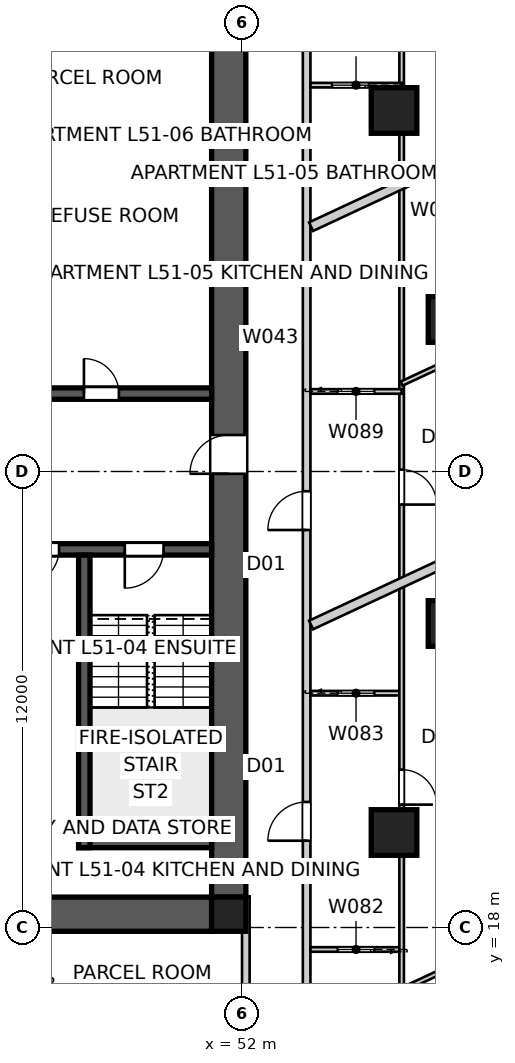
"""IFC4 building model, lengths in metres.
Left out: names, types, materials, properties, quantities, classifications, styles, units other than length and angle.
Written with IfcOpenShell. Run it as: python <this file> out.ifc"""

import sys

from ifc_helpers import new_model, si_unit, direction, frame, frame_2d, origin, origin_2d, place, context, subcontext, project, spatial, polyline, rectangle, outline, extrude, element, fill, save


model = new_model("IFC4")
c1 = context("Model", 3, precision=1e-05, world=origin(), true_north=direction((0.0, 1.0)))
c2 = subcontext(c1, "Body", "Model", "MODEL_VIEW")
j1 = project(units=[si_unit("LENGTHUNIT", "METRE"), si_unit("PLANEANGLEUNIT", "RADIAN")], contexts=[c1])
p1 = place(None, origin())
s1 = spatial("IfcSite", under=j1, at=p1, CompositionType="ELEMENT")
p2 = place(p1, origin())
s2 = spatial("IfcBuilding", under=s1, at=p2, CompositionType="ELEMENT")
p3 = place(p2, frame((0.0, 0.0, 186.2)))
s3 = spatial("IfcBuildingStorey", under=s2, at=p3, CompositionType="ELEMENT", Elevation=186.2)
p4 = place(p3, frame((51.2, 18.35, 0.0), z_axis=(0.0, 0.0, 1.0), x_axis=(-1.0, 0.0, 0.0)))
e1 = element("IfcWall", 1, at=p4, inside=s3, PredefinedType="SHEAR", context=c2, shape_type="SweptSolid", body=[
    extrude(outline(polyline([(0.0, -0.45), (22.4, -0.45), (22.4, -0.025), (22.85, -0.025), (22.85, 0.025), (22.4, 0.025), (22.4, 0.45), (0.0, 0.45), (0.0, 0.025), (-0.45, 0.025), (-0.45, -0.025), (0.0, -0.025), (0.0, -0.45)])), origin(), (0.0, 0.0, 1.0), 3.4),
])
p5 = place(p3, frame((51.65, 18.8, 0.0), z_axis=(0.0, 0.0, 1.0), x_axis=(0.0, 1.0, 0.0)))
e2 = element("IfcWall", 2, at=p5, inside=s3, PredefinedType="SHEAR", context=c2, shape_type="SweptSolid", body=[
    extrude(outline(polyline([(0.0, -0.45), (22.4, -0.45), (22.4, -0.025), (22.85, -0.025), (22.85, 0.025), (22.4, 0.025), (22.4, 0.45), (0.0, 0.45), (0.0, 0.025), (-0.45, 0.025), (-0.45, -0.025), (0.0, -0.025), (0.0, -0.45)])), origin(), (0.0, 0.0, 1.0), 3.4),
])
p6 = place(p5, frame((11.14, 0.0, 0.0)))
e3 = element("IfcOpeningElement", 3, at=p6, cuts=e2, PredefinedType="OPENING", context=c2, shape_type="SweptSolid", body=[
    extrude(rectangle(XDim=1.02, YDim=2.4, at=frame_2d((0.51, 1.2))), frame((0.0, 0.46, 0.0), z_axis=(0.0, -1.0, 0.0), x_axis=(1.0, 0.0, 0.0)), (0.0, 0.0, 1.0), 0.92),
])
p7 = place(p3, frame((28.8, 32.05, 0.0), z_axis=(0.0, 0.0, 1.0), x_axis=(1.0, 0.0, 0.0)))
e4 = element("IfcWall", 4, at=p7, inside=s3, PredefinedType="SHEAR", context=c2, shape_type="SweptSolid", body=[
    extrude(rectangle(XDim=22.4, YDim=0.3, at=frame_2d((11.2, 0.0))), origin(), (0.0, 0.0, 1.0), 3.4),
])
p8 = place(p7, frame((19.04, 0.0, 0.0)))
e5 = element("IfcOpeningElement", 5, at=p8, cuts=e4, PredefinedType="OPENING", context=c2, shape_type="SweptSolid", body=[
    extrude(rectangle(XDim=0.92, YDim=2.1, at=frame_2d((0.46, 1.05))), frame((0.0, 0.16, 0.0), z_axis=(0.0, -1.0, 0.0), x_axis=(1.0, 0.0, 0.0)), (0.0, 0.0, 1.0), 0.32),
])
p9 = place(p7, frame((1.265, 0.0, 0.0)))
e6 = element("IfcOpeningElement", 6, at=p9, cuts=e4, PredefinedType="OPENING", context=c2, shape_type="SweptSolid", body=[
    extrude(rectangle(XDim=1.02, YDim=2.1, at=frame_2d((0.51, 1.05))), frame((0.0, 0.16, 0.0), z_axis=(0.0, -1.0, 0.0), x_axis=(1.0, 0.0, 0.0)), (0.0, 0.0, 1.0), 0.32),
])
p10 = place(p7, frame((4.015, 0.0, 0.0)))
e7 = element("IfcOpeningElement", 7, at=p10, cuts=e4, PredefinedType="OPENING", context=c2, shape_type="SweptSolid", body=[
    extrude(rectangle(XDim=0.92, YDim=2.1, at=frame_2d((0.46, 1.05))), frame((0.0, 0.16, 0.0), z_axis=(0.0, -1.0, 0.0), x_axis=(1.0, 0.0, 0.0)), (0.0, 0.0, 1.0), 0.32),
])
p11 = place(p7, frame((6.565, 0.0, 0.0)))
e8 = element("IfcOpeningElement", 8, at=p11, cuts=e4, PredefinedType="OPENING", context=c2, shape_type="SweptSolid", body=[
    extrude(rectangle(XDim=0.92, YDim=2.1, at=frame_2d((0.46, 1.05))), frame((0.0, 0.16, 0.0), z_axis=(0.0, -1.0, 0.0), x_axis=(1.0, 0.0, 0.0)), (0.0, 0.0, 1.0), 0.32),
])
p12 = place(p7, frame((8.89, 0.0, 0.0)))
e9 = element("IfcOpeningElement", 9, at=p12, cuts=e4, PredefinedType="OPENING", context=c2, shape_type="SweptSolid", body=[
    extrude(rectangle(XDim=0.92, YDim=2.1, at=frame_2d((0.46, 1.05))), frame((0.0, 0.16, 0.0), z_axis=(0.0, -1.0, 0.0), x_axis=(1.0, 0.0, 0.0)), (0.0, 0.0, 1.0), 0.32),
])
p13 = place(p7, frame((14.85, 0.0, 0.0)))
e10 = element("IfcOpeningElement", 10, at=p13, cuts=e4, PredefinedType="OPENING", context=c2, shape_type="SweptSolid", body=[
    extrude(rectangle(XDim=1.1, YDim=2.1, at=frame_2d((0.55, 1.05))), frame((0.0, 0.16, 0.0), z_axis=(0.0, -1.0, 0.0), x_axis=(1.0, 0.0, 0.0)), (0.0, 0.0, 1.0), 0.32),
])
p14 = place(p3, frame((51.2, 27.95, 0.0), z_axis=(0.0, 0.0, 1.0), x_axis=(-1.0, 0.0, 0.0)))
e11 = element("IfcWall", 11, at=p14, inside=s3, PredefinedType="SHEAR", context=c2, shape_type="SweptSolid", body=[
    extrude(rectangle(XDim=22.4, YDim=0.3, at=frame_2d((11.2, 0.0))), origin(), (0.0, 0.0, 1.0), 3.4),
])
p15 = place(p14, frame((19.04, 0.0, 0.0)))
e12 = element("IfcOpeningElement", 12, at=p15, cuts=e11, PredefinedType="OPENING", context=c2, shape_type="SweptSolid", body=[
    extrude(rectangle(XDim=0.92, YDim=2.1, at=frame_2d((0.46, 1.05))), frame((0.0, 0.16, 0.0), z_axis=(0.0, -1.0, 0.0), x_axis=(1.0, 0.0, 0.0)), (0.0, 0.0, 1.0), 0.32),
])
p16 = place(p14, frame((1.265, 0.0, 0.0)))
e13 = element("IfcOpeningElement", 13, at=p16, cuts=e11, PredefinedType="OPENING", context=c2, shape_type="SweptSolid", body=[
    extrude(rectangle(XDim=1.02, YDim=2.1, at=frame_2d((0.51, 1.05))), frame((0.0, 0.16, 0.0), z_axis=(0.0, -1.0, 0.0), x_axis=(1.0, 0.0, 0.0)), (0.0, 0.0, 1.0), 0.32),
])
p17 = place(p14, frame((4.015, 0.0, 0.0)))
e14 = element("IfcOpeningElement", 14, at=p17, cuts=e11, PredefinedType="OPENING", context=c2, shape_type="SweptSolid", body=[
    extrude(rectangle(XDim=0.92, YDim=2.1, at=frame_2d((0.46, 1.05))), frame((0.0, 0.16, 0.0), z_axis=(0.0, -1.0, 0.0), x_axis=(1.0, 0.0, 0.0)), (0.0, 0.0, 1.0), 0.32),
])
p18 = place(p14, frame((6.45, 0.0, 0.0)))
e15 = element("IfcOpeningElement", 15, at=p18, cuts=e11, PredefinedType="OPENING", context=c2, shape_type="SweptSolid", body=[
    extrude(rectangle(XDim=1.1, YDim=2.1, at=frame_2d((0.55, 1.05))), frame((0.0, 0.16, 0.0), z_axis=(0.0, -1.0, 0.0), x_axis=(1.0, 0.0, 0.0)), (0.0, 0.0, 1.0), 0.32),
])
p19 = place(p14, frame((9.25, 0.0, 0.0)))
e16 = element("IfcOpeningElement", 16, at=p19, cuts=e11, PredefinedType="OPENING", context=c2, shape_type="SweptSolid", body=[
    extrude(rectangle(XDim=1.1, YDim=2.1, at=frame_2d((0.55, 1.05))), frame((0.0, 0.16, 0.0), z_axis=(0.0, -1.0, 0.0), x_axis=(1.0, 0.0, 0.0)), (0.0, 0.0, 1.0), 0.32),
])
p20 = place(p14, frame((14.85, 0.0, 0.0)))
e17 = element("IfcOpeningElement", 17, at=p20, cuts=e11, PredefinedType="OPENING", context=c2, shape_type="SweptSolid", body=[
    extrude(rectangle(XDim=1.1, YDim=2.1, at=frame_2d((0.55, 1.05))), frame((0.0, 0.16, 0.0), z_axis=(0.0, -1.0, 0.0), x_axis=(1.0, 0.0, 0.0)), (0.0, 0.0, 1.0), 0.32),
])
p21 = place(p3, frame((47.85, 27.8, 0.0), z_axis=(0.0, 0.0, 1.0), x_axis=(0.0, -1.0, 0.0)))
e18 = element("IfcWall", 18, at=p21, inside=s3, PredefinedType="SHEAR", context=c2, shape_type="SweptSolid", body=[
    extrude(rectangle(XDim=7.7, YDim=0.3, at=frame_2d((3.85, 0.0))), origin(), (0.0, 0.0, 1.0), 3.4),
])
p22 = place(p3, frame((51.2, 20.25, 0.0), z_axis=(0.0, 0.0, 1.0), x_axis=(-1.0, 0.0, 0.0)))
e19 = element("IfcWall", 19, at=p22, inside=s3, PredefinedType="SHEAR", context=c2, shape_type="SweptSolid", body=[
    extrude(rectangle(XDim=3.5, YDim=0.3, at=frame_2d((1.75, 0.0))), origin(), (0.0, 0.0, 1.0), 3.4),
])
p23 = place(p3, frame((51.65, 18.35, 0.0), z_axis=(0.0, 0.0, 1.0), x_axis=(1.0, 0.0, 0.0)))
e20 = element("IfcColumn", 20, at=p23, inside=s3, PredefinedType="COLUMN", context=c2, shape_type="SweptSolid", body=[
    extrude(rectangle(XDim=0.9, YDim=0.9, at=origin_2d()), origin(), (0.0, 0.0, 1.0), 3.4),
])
for number, where, z_axis, x_axis in (
    (21, (57.5, 26.0, 0.0), (0.0, 0.0, 1.0), (1.0, 0.0, 0.0)),
    (22, (57.5, 34.0, 0.0), (0.0, 0.0, 1.0), (1.0, 0.0, 0.0)),
    (23, (56.0, 39.5, 0.0), (0.0, 0.0, 1.0), (1.0, 0.0, 0.0)),
    (24, (56.0, 20.5, 0.0), (0.0, 0.0, 1.0), (1.0, 0.0, 0.0)),
):
    element("IfcColumn", number, at=place(p3, frame(where, z_axis=z_axis, x_axis=x_axis)), inside=s3, PredefinedType="COLUMN", context=c2, shape_type="SweptSolid", body=[
        extrude(rectangle(XDim=1.2, YDim=1.2, at=origin_2d()), origin(), (0.0, 0.0, 1.0), 3.4),
    ])
p24 = place(p3, frame((53.7, 13.3, 0.0), z_axis=(0.0, 0.0, 1.0), x_axis=(0.0, 1.0, 0.0)))
e25 = element("IfcWall", 25, at=p24, inside=s3, PredefinedType="PARTITIONING", context=c2, shape_type="SweptSolid", body=[
    extrude(rectangle(XDim=33.8, YDim=0.2, at=frame_2d((16.9, 0.0))), origin(), (0.0, 0.0, 1.0), 3.25),
])
p25 = place(p24, frame((6.984, 0.0, 0.0)))
e26 = element("IfcOpeningElement", 26, at=p25, cuts=e25, PredefinedType="OPENING", context=c2, shape_type="SweptSolid", body=[
    extrude(rectangle(XDim=1.02, YDim=2.34, at=frame_2d((0.51, 1.17))), frame((0.0, 0.11, 0.0), z_axis=(0.0, -1.0, 0.0), x_axis=(1.0, 0.0, 0.0)), (0.0, 0.0, 1.0), 0.22),
])
p26 = place(p24, frame((29.648, 0.0, 0.0)))
e27 = element("IfcOpeningElement", 27, at=p26, cuts=e25, PredefinedType="OPENING", context=c2, shape_type="SweptSolid", body=[
    extrude(rectangle(XDim=1.02, YDim=2.34, at=frame_2d((0.51, 1.17))), frame((0.0, 0.11, 0.0), z_axis=(0.0, -1.0, 0.0), x_axis=(1.0, 0.0, 0.0)), (0.0, 0.0, 1.0), 0.22),
])
p27 = place(p24, frame((15.16, 0.0, 0.0)))
e28 = element("IfcOpeningElement", 28, at=p27, cuts=e25, PredefinedType="OPENING", context=c2, shape_type="SweptSolid", body=[
    extrude(rectangle(XDim=1.02, YDim=2.34, at=frame_2d((0.51, 1.17))), frame((0.0, 0.11, 0.0), z_axis=(0.0, -1.0, 0.0), x_axis=(1.0, 0.0, 0.0)), (0.0, 0.0, 1.0), 0.22),
])
p28 = place(p3, frame((60.845, 39.72, 0.0), z_axis=(0.0, 0.0, 1.0), x_axis=(-0.906308569177, -0.422616584432, 0.0)))
e29 = element("IfcWall", 29, at=p28, inside=s3, PredefinedType="PARTITIONING", context=c2, shape_type="SweptSolid", body=[
    extrude(rectangle(XDim=7.755, YDim=0.25, at=frame_2d((3.877, 0.0))), origin(), (0.0, 0.0, 1.0), 3.25),
])
p29 = place(p3, frame((64.86, 31.11, 0.0), z_axis=(0.0, 0.0, 1.0), x_axis=(-0.906303906082, -0.422626584374, 0.0)))
e30 = element("IfcWall", 30, at=p29, inside=s3, PredefinedType="PARTITIONING", context=c2, shape_type="SweptSolid", body=[
    extrude(rectangle(XDim=12.185, YDim=0.25, at=frame_2d((6.092, 0.0))), origin(), (0.0, 0.0, 1.0), 3.25),
])
p30 = place(p3, frame((52.1, 15.65, 0.0), z_axis=(0.0, 0.0, 1.0), x_axis=(0.0, 1.0, 0.0)))
e31 = element("IfcWall", 31, at=p30, inside=s3, PredefinedType="PARTITIONING", context=c2, shape_type="SweptSolid", body=[
    extrude(rectangle(XDim=3.17, YDim=0.2, at=frame_2d((1.585, 0.0))), origin(), (0.0, 0.0, 1.0), 3.25),
])
p31 = place(p3, frame((56.2, 17.422, 0.0), z_axis=(0.0, 0.0, 1.0), x_axis=(-1.0, 0.0, 0.0)))
e32 = element("IfcWall", 32, at=p31, inside=s3, PredefinedType="PARTITIONING", context=c2, shape_type="SweptSolid", body=[
    extrude(rectangle(XDim=2.4, YDim=0.12, at=frame_2d((1.2, 0.0))), origin(), (0.0, 0.0, 1.0), 3.25),
])
p32 = place(p31, frame((0.72, 0.0, 0.0)))
e33 = element("IfcOpeningElement", 33, at=p32, cuts=e32, PredefinedType="OPENING", context=c2, shape_type="SweptSolid", body=[
    extrude(rectangle(XDim=0.96, YDim=2.1, at=frame_2d((0.48, 1.05))), frame((0.0, 0.07, 0.0), z_axis=(0.0, -1.0, 0.0), x_axis=(1.0, 0.0, 0.0)), (0.0, 0.0, 1.0), 0.14),
])
p33 = place(p3, frame((53.8, 24.166, 0.0), z_axis=(0.0, 0.0, 1.0), x_axis=(1.0, 0.0, 0.0)))
e34 = element("IfcWall", 34, at=p33, inside=s3, PredefinedType="PARTITIONING", context=c2, shape_type="SweptSolid", body=[
    extrude(rectangle(XDim=2.4, YDim=0.12, at=frame_2d((1.2, 0.0))), origin(), (0.0, 0.0, 1.0), 2.796),
])
p34 = place(p33, frame((0.72, 0.0, 0.0)))
e35 = element("IfcOpeningElement", 35, at=p34, cuts=e34, PredefinedType="OPENING", context=c2, shape_type="SweptSolid", body=[
    extrude(rectangle(XDim=0.96, YDim=2.1, at=frame_2d((0.48, 1.05))), frame((0.0, 0.07, 0.0), z_axis=(0.0, -1.0, 0.0), x_axis=(1.0, 0.0, 0.0)), (0.0, 0.0, 1.0), 0.14),
])
p35 = place(p3, frame((56.2, 49.642, 0.0), z_axis=(0.0, 0.0, 1.0), x_axis=(0.0, -1.0, 0.0)))
e36 = element("IfcWall", 36, at=p35, inside=s3, PredefinedType="PARTITIONING", context=c2, shape_type="SweptSolid", body=[
    extrude(rectangle(XDim=37.421, YDim=0.12, at=frame_2d((18.71, 0.0))), origin(), (0.0, 0.0, 1.0), 2.55),
])
p36 = place(p35, frame((27.488, 0.0, 0.0)))
e37 = element("IfcOpeningElement", 37, at=p36, cuts=e36, PredefinedType="OPENING", context=c2, shape_type="SweptSolid", body=[
    extrude(rectangle(XDim=0.92, YDim=2.34, at=frame_2d((0.46, 1.17))), frame((0.0, 0.07, 0.0), z_axis=(0.0, -1.0, 0.0), x_axis=(1.0, 0.0, 0.0)), (0.0, 0.0, 1.0), 0.14),
])
p37 = place(p35, frame((5.08, 0.0, 0.0)))
e38 = element("IfcOpeningElement", 38, at=p37, cuts=e36, PredefinedType="OPENING", context=c2, shape_type="SweptSolid", body=[
    extrude(rectangle(XDim=0.92, YDim=2.34, at=frame_2d((0.46, 1.17))), frame((0.0, 0.07, 0.0), z_axis=(0.0, -1.0, 0.0), x_axis=(1.0, 0.0, 0.0)), (0.0, 0.0, 1.0), 0.14),
])
p38 = place(p35, frame((19.592, 0.0, 0.0)))
e39 = element("IfcOpeningElement", 39, at=p38, cuts=e36, PredefinedType="OPENING", context=c2, shape_type="SweptSolid", body=[
    extrude(rectangle(XDim=0.92, YDim=2.34, at=frame_2d((0.46, 1.17))), frame((0.0, 0.07, 0.0), z_axis=(0.0, -1.0, 0.0), x_axis=(1.0, 0.0, 0.0)), (0.0, 0.0, 1.0), 0.14),
])
p39 = place(p3, frame((65.303, 20.6, 0.0), z_axis=(0.0, 0.0, 1.0), x_axis=(-0.906300466163, -0.422633961049, 0.0)))
e40 = element("IfcWall", 40, at=p39, inside=s3, PredefinedType="PARTITIONING", context=c2, shape_type="SweptSolid", body=[
    extrude(rectangle(XDim=10.044, YDim=0.12, at=frame_2d((5.022, 0.0))), origin(), (0.0, 0.0, 1.0), 3.25),
])
p40 = place(p39, frame((6.892, 0.0, 0.0)))
e41 = element("IfcOpeningElement", 41, at=p40, cuts=e40, PredefinedType="OPENING", context=c2, shape_type="SweptSolid", body=[
    extrude(rectangle(XDim=0.92, YDim=2.34, at=frame_2d((0.46, 1.17))), frame((0.0, 0.07, 0.0), z_axis=(0.0, -1.0, 0.0), x_axis=(1.0, 0.0, 0.0)), (0.0, 0.0, 1.0), 0.14),
])
p41 = place(p39, frame((1.9, 0.0, 0.0)))
e42 = element("IfcOpeningElement", 42, at=p41, cuts=e40, PredefinedType="OPENING", context=c2, shape_type="SweptSolid", body=[
    extrude(rectangle(XDim=0.92, YDim=2.34, at=frame_2d((0.46, 1.17))), frame((0.0, 0.07, 0.0), z_axis=(0.0, -1.0, 0.0), x_axis=(1.0, 0.0, 0.0)), (0.0, 0.0, 1.0), 0.14),
])
p42 = place(p3, frame((53.8, 32.107, 0.0), z_axis=(0.0, 0.0, 1.0), x_axis=(1.0, 0.0, 0.0)))
e43 = element("IfcWall", 43, at=p42, inside=s3, PredefinedType="PARTITIONING", context=c2, shape_type="SweptSolid", body=[
    extrude(rectangle(XDim=2.4, YDim=0.12, at=frame_2d((1.2, 0.0))), origin(), (0.0, 0.0, 1.0), 3.25),
])
p43 = place(p42, frame((0.72, 0.0, 0.0)))
e44 = element("IfcOpeningElement", 44, at=p43, cuts=e43, PredefinedType="OPENING", context=c2, shape_type="SweptSolid", body=[
    extrude(rectangle(XDim=0.96, YDim=2.1, at=frame_2d((0.48, 1.05))), frame((0.0, 0.07, 0.0), z_axis=(0.0, -1.0, 0.0), x_axis=(1.0, 0.0, 0.0)), (0.0, 0.0, 1.0), 0.14),
])
p44 = place(p3, frame((56.2, 32.313, 0.0), z_axis=(0.0, 0.0, 1.0), x_axis=(0.906306986906, 0.422619977621, 0.0)))
e45 = element("IfcWall", 45, at=p44, inside=s3, PredefinedType="PARTITIONING", context=c2, shape_type="SweptSolid", body=[
    extrude(rectangle(XDim=7.3, YDim=0.12, at=frame_2d((3.65, 0.0))), origin(), (0.0, 0.0, 1.0), 3.25),
])
p45 = place(p44, frame((3.21, 0.0, 0.0)))
e46 = element("IfcOpeningElement", 46, at=p45, cuts=e45, PredefinedType="OPENING", context=c2, shape_type="SweptSolid", body=[
    extrude(rectangle(XDim=0.92, YDim=2.34, at=frame_2d((0.46, 1.17))), frame((0.0, 0.07, 0.0), z_axis=(0.0, -1.0, 0.0), x_axis=(1.0, 0.0, 0.0)), (0.0, 0.0, 1.0), 0.14),
])
p46 = place(p3, frame((56.2, 40.167, 0.0), z_axis=(0.0, 0.0, 1.0), x_axis=(-1.0, 0.0, 0.0)))
e47 = element("IfcWall", 47, at=p46, inside=s3, PredefinedType="PARTITIONING", context=c2, shape_type="SweptSolid", body=[
    extrude(rectangle(XDim=2.4, YDim=0.12, at=frame_2d((1.2, 0.0))), origin(), (0.0, 0.0, 1.0), 3.25),
])
p47 = place(p46, frame((0.87, 0.0, 0.0)))
e48 = element("IfcOpeningElement", 48, at=p47, cuts=e47, PredefinedType="OPENING", context=c2, shape_type="SweptSolid", body=[
    extrude(rectangle(XDim=0.96, YDim=2.1, at=frame_2d((0.48, 1.05))), frame((0.0, 0.07, 0.0), z_axis=(0.0, -1.0, 0.0), x_axis=(1.0, 0.0, 0.0)), (0.0, 0.0, 1.0), 0.14),
])
p48 = place(p8, origin())
e49 = element("IfcDoor", 49, at=p48, inside=s3, OperationType="SINGLE_SWING_LEFT", PredefinedType="DOOR", context=c2, shape_type="SweptSolid", body=[
    extrude(rectangle(XDim=0.92, YDim=2.1, at=frame_2d((0.46, 1.05))), frame((0.0, 0.025, 0.0), z_axis=(0.0, -1.0, 0.0), x_axis=(1.0, 0.0, 0.0)), (0.0, 0.0, 1.0), 0.05),
])
fill(e5, e49)
p49 = place(p16, origin())
e50 = element("IfcDoor", 50, at=p49, inside=s3, OperationType="SINGLE_SWING_RIGHT", PredefinedType="DOOR", context=c2, shape_type="SweptSolid", body=[
    extrude(rectangle(XDim=1.02, YDim=2.1, at=frame_2d((0.51, 1.05))), frame((0.0, 0.025, 0.0), z_axis=(0.0, -1.0, 0.0), x_axis=(1.0, 0.0, 0.0)), (0.0, 0.0, 1.0), 0.05),
])
fill(e13, e50)
p50 = place(p17, origin())
e51 = element("IfcDoor", 51, at=p50, inside=s3, OperationType="SINGLE_SWING_RIGHT", PredefinedType="DOOR", context=c2, shape_type="SweptSolid", body=[
    extrude(rectangle(XDim=0.92, YDim=2.1, at=frame_2d((0.46, 1.05))), frame((0.0, 0.025, 0.0), z_axis=(0.0, -1.0, 0.0), x_axis=(1.0, 0.0, 0.0)), (0.0, 0.0, 1.0), 0.05),
])
fill(e14, e51)
p51 = place(p25, origin())
e52 = element("IfcDoor", 52, at=p51, inside=s3, OperationType="SINGLE_SWING_LEFT", PredefinedType="DOOR", context=c2, shape_type="SweptSolid", body=[
    extrude(rectangle(XDim=1.02, YDim=2.34, at=frame_2d((0.51, 1.17))), frame((0.0, 0.025, 0.0), z_axis=(0.0, -1.0, 0.0), x_axis=(1.0, 0.0, 0.0)), (0.0, 0.0, 1.0), 0.05),
])
fill(e26, e52)
p52 = place(p27, origin())
e53 = element("IfcDoor", 53, at=p52, inside=s3, OperationType="SINGLE_SWING_LEFT", PredefinedType="DOOR", context=c2, shape_type="SweptSolid", body=[
    extrude(rectangle(XDim=1.02, YDim=2.34, at=frame_2d((0.51, 1.17))), frame((0.0, 0.025, 0.0), z_axis=(0.0, -1.0, 0.0), x_axis=(1.0, 0.0, 0.0)), (0.0, 0.0, 1.0), 0.05),
])
fill(e28, e53)
p53 = place(p36, origin())
e54 = element("IfcDoor", 54, at=p53, inside=s3, OperationType="SINGLE_SWING_RIGHT", PredefinedType="DOOR", context=c2, shape_type="SweptSolid", body=[
    extrude(rectangle(XDim=0.92, YDim=2.34, at=frame_2d((0.46, 1.17))), frame((0.0, 0.025, 0.0), z_axis=(0.0, -1.0, 0.0), x_axis=(1.0, 0.0, 0.0)), (0.0, 0.0, 1.0), 0.05),
])
fill(e37, e54)
p54 = place(p32, origin())
e55 = element("IfcDoor", 55, at=p54, inside=s3, OperationType="SLIDING_TO_LEFT", PredefinedType="DOOR", context=c2, shape_type="SweptSolid", body=[
    extrude(rectangle(XDim=0.96, YDim=2.1, at=frame_2d((0.48, 1.05))), frame((0.0, 0.025, 0.0), z_axis=(0.0, -1.0, 0.0), x_axis=(1.0, 0.0, 0.0)), (0.0, 0.0, 1.0), 0.05),
])
fill(e33, e55)
p55 = place(p34, origin())
e56 = element("IfcDoor", 56, at=p55, inside=s3, OperationType="SLIDING_TO_LEFT", PredefinedType="DOOR", context=c2, shape_type="SweptSolid", body=[
    extrude(rectangle(XDim=0.96, YDim=2.1, at=frame_2d((0.48, 1.05))), frame((0.0, 0.025, 0.0), z_axis=(0.0, -1.0, 0.0), x_axis=(1.0, 0.0, 0.0)), (0.0, 0.0, 1.0), 0.05),
])
fill(e35, e56)
p56 = place(p47, origin())
e57 = element("IfcDoor", 57, at=p56, inside=s3, OperationType="SLIDING_TO_LEFT", PredefinedType="DOOR", context=c2, shape_type="SweptSolid", body=[
    extrude(rectangle(XDim=0.96, YDim=2.1, at=frame_2d((0.48, 1.05))), frame((0.0, 0.025, 0.0), z_axis=(0.0, -1.0, 0.0), x_axis=(1.0, 0.0, 0.0)), (0.0, 0.0, 1.0), 0.05),
])
fill(e48, e57)
p57 = place(p38, origin())
e58 = element("IfcDoor", 58, at=p57, inside=s3, OperationType="SINGLE_SWING_RIGHT", PredefinedType="DOOR", context=c2, shape_type="SweptSolid", body=[
    extrude(rectangle(XDim=0.92, YDim=2.34, at=frame_2d((0.46, 1.17))), frame((0.0, 0.025, 0.0), z_axis=(0.0, -1.0, 0.0), x_axis=(1.0, 0.0, 0.0)), (0.0, 0.0, 1.0), 0.05),
])
fill(e39, e58)
p58 = place(p43, origin())
e59 = element("IfcDoor", 59, at=p58, inside=s3, OperationType="SLIDING_TO_LEFT", PredefinedType="DOOR", context=c2, shape_type="SweptSolid", body=[
    extrude(rectangle(XDim=0.96, YDim=2.1, at=frame_2d((0.48, 1.05))), frame((0.0, 0.025, 0.0), z_axis=(0.0, -1.0, 0.0), x_axis=(1.0, 0.0, 0.0)), (0.0, 0.0, 1.0), 0.05),
])
fill(e44, e59)
p59 = place(p6, origin())
e60 = element("IfcDoor", 60, at=p59, inside=s3, OperationType="SINGLE_SWING_LEFT", PredefinedType="DOOR", context=c2, shape_type="SweptSolid", body=[
    extrude(rectangle(XDim=1.02, YDim=2.4, at=frame_2d((0.51, 1.2))), frame((0.0, 0.025, 0.0), z_axis=(0.0, -1.0, 0.0), x_axis=(1.0, 0.0, 0.0)), (0.0, 0.0, 1.0), 0.05),
])
fill(e3, e60)
save(model, sys.argv[1])
